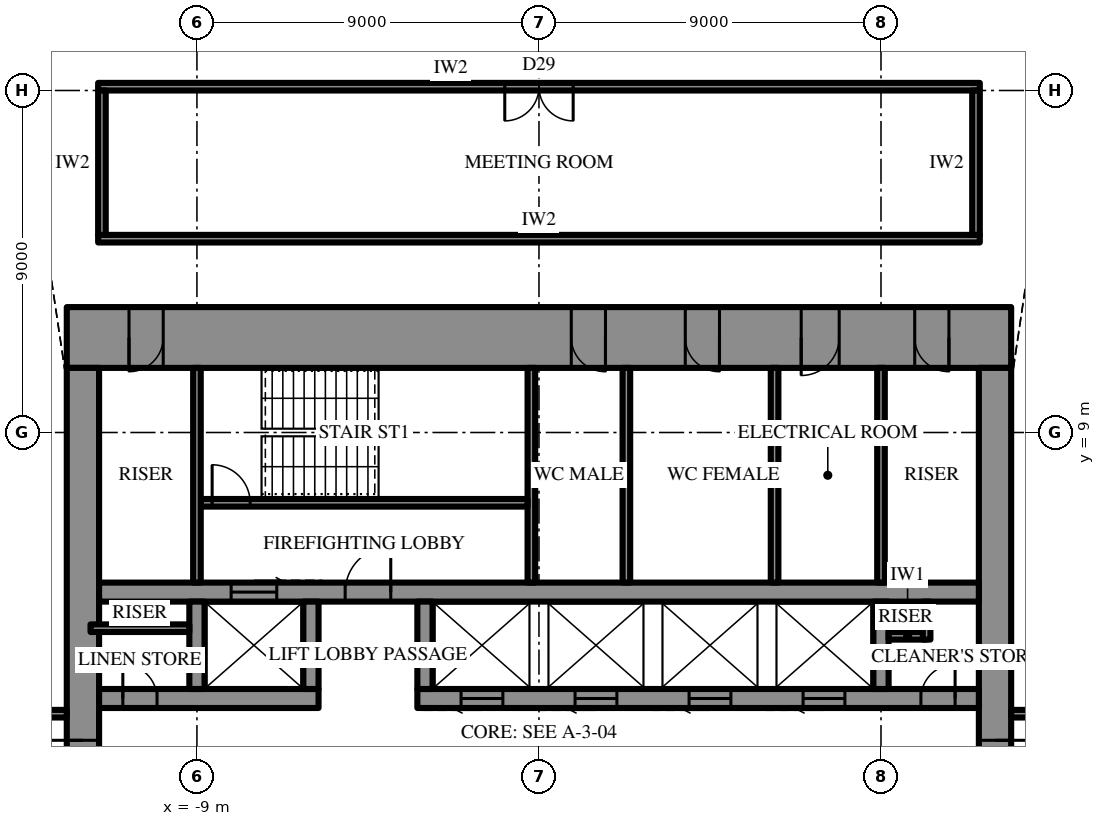
"""IFC4 building model, lengths in metres.
Left out: names, types, materials, properties, quantities, classifications, styles, units other than length and angle.
Written with IfcOpenShell. Run it as: python <this file> out.ifc"""

import sys

from ifc_helpers import new_model, si_unit, direction, frame, frame_2d, origin, place, context, subcontext, project, spatial, rectangle, extrude, element, fill, save


model = new_model("IFC4")
c1 = context("Model", 3, precision=1e-05, world=origin(), true_north=direction((0.0, 1.0)))
c2 = subcontext(c1, "Body", "Model", "MODEL_VIEW")
j1 = project(units=[si_unit("LENGTHUNIT", "METRE"), si_unit("PLANEANGLEUNIT", "RADIAN")], contexts=[c1])
p1 = place(None, origin())
s1 = spatial("IfcSite", under=j1, at=p1, CompositionType="ELEMENT")
p2 = place(p1, origin())
s2 = spatial("IfcBuilding", under=s1, at=p2, CompositionType="ELEMENT")
p3 = place(p2, frame((0.0, 0.0, 315.7)))
s3 = spatial("IfcBuildingStorey", under=s2, at=p3, CompositionType="ELEMENT", Elevation=315.7)
p4 = place(p3, frame((-12.425, 11.5, 0.0), z_axis=(0.0, 0.0, 1.0), x_axis=(1.0, 0.0, 0.0)))
e1 = element("IfcWall", 1, at=p4, inside=s3, PredefinedType="SHEAR", context=c2, shape_type="SweptSolid", body=[
    extrude(rectangle(XDim=24.85, YDim=1.6, at=frame_2d((12.425, 0.0))), origin(), (0.0, 0.0, 1.0), 4.2),
])
p5 = place(p4, frame((13.275, 0.0, 0.0)))
e2 = element("IfcOpeningElement", 2, at=p5, cuts=e1, PredefinedType="OPENING", context=c2, shape_type="SweptSolid", body=[
    extrude(rectangle(XDim=0.9, YDim=2.2, at=frame_2d((0.45, 1.1))), frame((0.0, 0.81, 0.0), z_axis=(0.0, -1.0, 0.0), x_axis=(1.0, 0.0, 0.0)), (0.0, 0.0, 1.0), 1.62),
])
p6 = place(p4, frame((16.275, 0.0, 0.0)))
e3 = element("IfcOpeningElement", 3, at=p6, cuts=e1, PredefinedType="OPENING", context=c2, shape_type="SweptSolid", body=[
    extrude(rectangle(XDim=0.9, YDim=2.2, at=frame_2d((0.45, 1.1))), frame((0.0, 0.81, 0.0), z_axis=(0.0, -1.0, 0.0), x_axis=(1.0, 0.0, 0.0)), (0.0, 0.0, 1.0), 1.62),
])
p7 = place(p4, frame((19.325, 0.0, 0.0)))
e4 = element("IfcOpeningElement", 4, at=p7, cuts=e1, PredefinedType="OPENING", context=c2, shape_type="SweptSolid", body=[
    extrude(rectangle(XDim=1.0, YDim=2.2, at=frame_2d((0.5, 1.1))), frame((0.0, 0.81, 0.0), z_axis=(0.0, -1.0, 0.0), x_axis=(1.0, 0.0, 0.0)), (0.0, 0.0, 1.0), 1.62),
])
p8 = place(p4, frame((1.637, 0.0, 0.0)))
e5 = element("IfcOpeningElement", 5, at=p8, cuts=e1, PredefinedType="OPENING", context=c2, shape_type="SweptSolid", body=[
    extrude(rectangle(XDim=0.9, YDim=2.2, at=frame_2d((0.45, 1.1))), frame((0.0, 0.81, 0.0), z_axis=(0.0, -1.0, 0.0), x_axis=(1.0, 0.0, 0.0)), (0.0, 0.0, 1.0), 1.62),
])
p9 = place(p4, frame((22.312, 0.0, 0.0)))
e6 = element("IfcOpeningElement", 6, at=p9, cuts=e1, PredefinedType="OPENING", context=c2, shape_type="SweptSolid", body=[
    extrude(rectangle(XDim=0.9, YDim=2.2, at=frame_2d((0.45, 1.1))), frame((0.0, 0.81, 0.0), z_axis=(0.0, -1.0, 0.0), x_axis=(1.0, 0.0, 0.0)), (0.0, 0.0, 1.0), 1.62),
])
p10 = place(p3, frame((12.0, -10.7, 0.0), z_axis=(0.0, 0.0, 1.0), x_axis=(0.0, 1.0, 0.0)))
e7 = element("IfcWall", 7, at=p10, inside=s3, PredefinedType="SHEAR", context=c2, shape_type="SweptSolid", body=[
    extrude(rectangle(XDim=21.4, YDim=0.85, at=frame_2d((10.7, 0.0))), origin(), (0.0, 0.0, 1.0), 4.2),
])
p11 = place(p10, frame((9.8, 0.0, 0.0)))
e8 = element("IfcOpeningElement", 8, at=p11, cuts=e7, PredefinedType="OPENING", context=c2, shape_type="SweptSolid", body=[
    extrude(rectangle(XDim=1.8, YDim=2.4, at=frame_2d((0.9, 1.2))), frame((0.0, 0.435, 0.0), z_axis=(0.0, -1.0, 0.0), x_axis=(1.0, 0.0, 0.0)), (0.0, 0.0, 1.0), 0.87),
])
p12 = place(p3, frame((-12.0, 10.7, 0.0), z_axis=(0.0, 0.0, 1.0), x_axis=(0.0, -1.0, 0.0)))
e9 = element("IfcWall", 9, at=p12, inside=s3, PredefinedType="SHEAR", context=c2, shape_type="SweptSolid", body=[
    extrude(rectangle(XDim=21.4, YDim=0.85, at=frame_2d((10.7, 0.0))), origin(), (0.0, 0.0, 1.0), 4.2),
])
p13 = place(p12, frame((9.8, 0.0, 0.0)))
e10 = element("IfcOpeningElement", 10, at=p13, cuts=e9, PredefinedType="OPENING", context=c2, shape_type="SweptSolid", body=[
    extrude(rectangle(XDim=1.8, YDim=2.4, at=frame_2d((0.9, 1.2))), frame((0.0, 0.435, 0.0), z_axis=(0.0, -1.0, 0.0), x_axis=(1.0, 0.0, 0.0)), (0.0, 0.0, 1.0), 0.87),
])
p14 = place(p3, frame((-11.575, 2.0, 0.0), z_axis=(0.0, 0.0, 1.0), x_axis=(1.0, 0.0, 0.0)))
e11 = element("IfcWall", 11, at=p14, inside=s3, PredefinedType="SHEAR", context=c2, shape_type="SweptSolid", body=[
    extrude(rectangle(XDim=5.775, YDim=0.5, at=frame_2d((2.887, 0.0))), origin(), (0.0, 0.0, 1.0), 4.2),
])
p15 = place(p14, frame((0.625, 0.0, 0.0)))
e12 = element("IfcOpeningElement", 12, at=p15, cuts=e11, PredefinedType="OPENING", context=c2, shape_type="SweptSolid", body=[
    extrude(rectangle(XDim=0.9, YDim=2.2, at=frame_2d((0.45, 1.1))), frame((0.0, 0.26, 0.0), z_axis=(0.0, -1.0, 0.0), x_axis=(1.0, 0.0, 0.0)), (0.0, 0.0, 1.0), 0.52),
])
p16 = place(p3, frame((-3.2, 2.0, 0.0), z_axis=(0.0, 0.0, 1.0), x_axis=(1.0, 0.0, 0.0)))
e13 = element("IfcWall", 13, at=p16, inside=s3, PredefinedType="SHEAR", context=c2, shape_type="SweptSolid", body=[
    extrude(rectangle(XDim=14.775, YDim=0.5, at=frame_2d((7.387, 0.0))), origin(), (0.0, 0.0, 1.0), 4.2),
])
p17 = place(p16, frame((13.25, 0.0, 0.0)))
e14 = element("IfcOpeningElement", 14, at=p17, cuts=e13, PredefinedType="OPENING", context=c2, shape_type="SweptSolid", body=[
    extrude(rectangle(XDim=0.9, YDim=2.2, at=frame_2d((0.45, 1.1))), frame((0.0, 0.26, 0.0), z_axis=(0.0, -1.0, 0.0), x_axis=(1.0, 0.0, 0.0)), (0.0, 0.0, 1.0), 0.52),
])
p18 = place(p16, frame((1.15, 0.0, 0.0)))
e15 = element("IfcOpeningElement", 15, at=p18, cuts=e13, PredefinedType="OPENING", context=c2, shape_type="SweptSolid", body=[
    extrude(rectangle(XDim=1.1, YDim=2.2, at=frame_2d((0.55, 1.1))), frame((0.0, 0.26, 0.0), z_axis=(0.0, -1.0, 0.0), x_axis=(1.0, 0.0, 0.0)), (0.0, 0.0, 1.0), 0.52),
])
p19 = place(p16, frame((4.15, 0.0, 0.0)))
e16 = element("IfcOpeningElement", 16, at=p19, cuts=e13, PredefinedType="OPENING", context=c2, shape_type="SweptSolid", body=[
    extrude(rectangle(XDim=1.1, YDim=2.2, at=frame_2d((0.55, 1.1))), frame((0.0, 0.26, 0.0), z_axis=(0.0, -1.0, 0.0), x_axis=(1.0, 0.0, 0.0)), (0.0, 0.0, 1.0), 0.52),
])
p20 = place(p16, frame((7.15, 0.0, 0.0)))
e17 = element("IfcOpeningElement", 17, at=p20, cuts=e13, PredefinedType="OPENING", context=c2, shape_type="SweptSolid", body=[
    extrude(rectangle(XDim=1.1, YDim=2.2, at=frame_2d((0.55, 1.1))), frame((0.0, 0.26, 0.0), z_axis=(0.0, -1.0, 0.0), x_axis=(1.0, 0.0, 0.0)), (0.0, 0.0, 1.0), 0.52),
])
p21 = place(p16, frame((10.15, 0.0, 0.0)))
e18 = element("IfcOpeningElement", 18, at=p21, cuts=e13, PredefinedType="OPENING", context=c2, shape_type="SweptSolid", body=[
    extrude(rectangle(XDim=1.1, YDim=2.2, at=frame_2d((0.55, 1.1))), frame((0.0, 0.26, 0.0), z_axis=(0.0, -1.0, 0.0), x_axis=(1.0, 0.0, 0.0)), (0.0, 0.0, 1.0), 0.52),
])
p22 = place(p3, frame((-11.575, 4.8, 0.0), z_axis=(0.0, 0.0, 1.0), x_axis=(1.0, 0.0, 0.0)))
e19 = element("IfcWall", 19, at=p22, inside=s3, PredefinedType="SHEAR", context=c2, shape_type="SweptSolid", body=[
    extrude(rectangle(XDim=23.15, YDim=0.5, at=frame_2d((11.575, 0.0))), origin(), (0.0, 0.0, 1.0), 4.2),
])
p23 = place(p22, frame((6.475, 0.0, 0.0)))
e20 = element("IfcOpeningElement", 20, at=p23, cuts=e19, PredefinedType="OPENING", context=c2, shape_type="SweptSolid", body=[
    extrude(rectangle(XDim=1.2, YDim=2.2, at=frame_2d((0.6, 1.1))), frame((0.0, 0.26, 0.0), z_axis=(0.0, -1.0, 0.0), x_axis=(1.0, 0.0, 0.0)), (0.0, 0.0, 1.0), 0.52),
])
p24 = place(p22, frame((3.475, 0.0, 0.0)))
e21 = element("IfcOpeningElement", 21, at=p24, cuts=e19, PredefinedType="OPENING", context=c2, shape_type="SweptSolid", body=[
    extrude(rectangle(XDim=1.2, YDim=2.2, at=frame_2d((0.6, 1.1))), frame((0.0, 0.26, 0.0), z_axis=(0.0, -1.0, 0.0), x_axis=(1.0, 0.0, 0.0)), (0.0, 0.0, 1.0), 0.52),
])
for number, where, z_axis, x_axis in (
    (22, (-9.0, 2.25, 0.0), (0.0, 0.0, 1.0), (0.0, 1.0, 0.0)),
    (23, (-6.0, 2.25, 0.0), (0.0, 0.0, 1.0), (0.0, 1.0, 0.0)),
    (24, (-3.0, 2.25, 0.0), (0.0, 0.0, 1.0), (0.0, 1.0, 0.0)),
    (25, (9.0, 2.25, 0.0), (0.0, 0.0, 1.0), (0.0, 1.0, 0.0)),
):
    element("IfcWall", number, at=place(p3, frame(where, z_axis=z_axis, x_axis=x_axis)), inside=s3, PredefinedType="SHEAR", context=c2, shape_type="SweptSolid", body=[
        extrude(rectangle(XDim=2.3, YDim=0.4, at=frame_2d((1.15, 0.0))), origin(), (0.0, 0.0, 1.0), 4.2),
    ])
p25 = place(p3, frame((-0.2, 5.05, 0.0), z_axis=(0.0, 0.0, 1.0), x_axis=(0.0, 1.0, 0.0)))
e26 = element("IfcWall", 26, at=p25, inside=s3, PredefinedType="SHEAR", context=c2, shape_type="SweptSolid", body=[
    extrude(rectangle(XDim=5.65, YDim=0.2, at=frame_2d((2.825, 0.0))), origin(), (0.0, 0.0, 1.0), 4.2),
])
p26 = place(p3, frame((-8.9, 7.15, 0.0), z_axis=(0.0, 0.0, 1.0), x_axis=(1.0, 0.0, 0.0)))
e27 = element("IfcWall", 27, at=p26, inside=s3, PredefinedType="SHEAR", context=c2, shape_type="SweptSolid", body=[
    extrude(rectangle(XDim=8.6, YDim=0.2, at=frame_2d((4.3, 0.0))), origin(), (0.0, 0.0, 1.0), 4.2),
])
p27 = place(p26, frame((0.3, 0.0, 0.0)))
e28 = element("IfcOpeningElement", 28, at=p27, cuts=e27, PredefinedType="OPENING", context=c2, shape_type="SweptSolid", body=[
    extrude(rectangle(XDim=1.0, YDim=2.2, at=frame_2d((0.5, 1.1))), frame((0.0, 0.11, 0.0), z_axis=(0.0, -1.0, 0.0), x_axis=(1.0, 0.0, 0.0)), (0.0, 0.0, 1.0), 0.22),
])
for number, where, z_axis, x_axis in (
    (29, (-9.0, 5.05, 0.0), (0.0, 0.0, 1.0), (0.0, 1.0, 0.0)),
    (30, (9.0, 5.05, 0.0), (0.0, 0.0, 1.0), (0.0, 1.0, 0.0)),
    (31, (2.3, 5.05, 0.0), (0.0, 0.0, 1.0), (0.0, 1.0, 0.0)),
    (32, (6.2, 5.05, 0.0), (0.0, 0.0, 1.0), (0.0, 1.0, 0.0)),
):
    element("IfcWall", number, at=place(p3, frame(where, z_axis=z_axis, x_axis=x_axis)), inside=s3, PredefinedType="PARTITIONING", context=c2, shape_type="SweptSolid", body=[
        extrude(rectangle(XDim=5.65, YDim=0.2, at=frame_2d((2.825, 0.0))), origin(), (0.0, 0.0, 1.0), 4.0),
    ])
p28 = place(p3, frame((-11.8, 3.85, 0.0), z_axis=(0.0, 0.0, 1.0), x_axis=(1.0, 0.0, 0.0)))
e33 = element("IfcWall", 33, at=p28, inside=s3, PredefinedType="PARTITIONING", context=c2, shape_type="SweptSolid", body=[
    extrude(rectangle(XDim=2.6, YDim=0.2, at=frame_2d((1.3, 0.0))), origin(), (0.0, 0.0, 1.0), 4.0),
])
for number, where, z_axis, x_axis in (
    (34, (9.2, 3.65, 0.0), (0.0, 0.0, 1.0), (1.0, 0.0, 0.0)),
    (35, (10.2, 3.55, 0.0), (0.0, 0.0, 1.0), (0.0, 1.0, 0.0)),
):
    element("IfcWall", number, at=place(p3, frame(where, z_axis=z_axis, x_axis=x_axis)), inside=s3, PredefinedType="PARTITIONING", context=c2, shape_type="SweptSolid", body=[
        extrude(rectangle(XDim=1.0, YDim=0.2, at=frame_2d((0.5, 0.0))), origin(), (0.0, 0.0, 1.0), 4.0),
    ])
p29 = place(p3, frame((-11.6, 14.1, 0.0), z_axis=(0.0, 0.0, 1.0), x_axis=(1.0, 0.0, 0.0)))
e36 = element("IfcWall", 36, at=p29, inside=s3, PredefinedType="PARTITIONING", context=c2, shape_type="SweptSolid", body=[
    extrude(rectangle(XDim=23.2, YDim=0.2, at=frame_2d((11.6, 0.0))), origin(), (0.0, 0.0, 1.0), 4.0),
])
p30 = place(p3, frame((-11.6, 18.1, 0.0), z_axis=(0.0, 0.0, 1.0), x_axis=(1.0, 0.0, 0.0)))
e37 = element("IfcWall", 37, at=p30, inside=s3, PredefinedType="PARTITIONING", context=c2, shape_type="SweptSolid", body=[
    extrude(rectangle(XDim=23.2, YDim=0.2, at=frame_2d((11.6, 0.0))), origin(), (0.0, 0.0, 1.0), 4.0),
])
p31 = place(p30, frame((10.7, 0.0, 0.0)))
e38 = element("IfcOpeningElement", 38, at=p31, cuts=e37, PredefinedType="OPENING", context=c2, shape_type="SweptSolid", body=[
    extrude(rectangle(XDim=1.8, YDim=2.4, at=frame_2d((0.9, 1.2))), frame((0.0, 0.11, 0.0), z_axis=(0.0, -1.0, 0.0), x_axis=(1.0, 0.0, 0.0)), (0.0, 0.0, 1.0), 0.22),
])
for number, where, z_axis, x_axis in (
    (39, (-11.5, 14.2, 0.0), (0.0, 0.0, 1.0), (0.0, 1.0, 0.0)),
    (40, (11.5, 14.2, 0.0), (0.0, 0.0, 1.0), (0.0, 1.0, 0.0)),
):
    element("IfcWall", number, at=place(p3, frame(where, z_axis=z_axis, x_axis=x_axis)), inside=s3, PredefinedType="PARTITIONING", context=c2, shape_type="SweptSolid", body=[
        extrude(rectangle(XDim=3.8, YDim=0.2, at=frame_2d((1.9, 0.0))), origin(), (0.0, 0.0, 1.0), 4.0),
    ])
p32 = place(p3, frame((12.425, 1.6, 0.0), z_axis=(0.0, 0.0, 1.0), x_axis=(1.0, 0.0, 0.0)))
e41 = element("IfcWall", 41, at=p32, inside=s3, PredefinedType="PARTITIONING", context=c2, shape_type="SweptSolid", body=[
    extrude(rectangle(XDim=16.327, YDim=0.2, at=frame_2d((8.164, 0.0))), origin(), (0.0, 0.0, 1.0), 4.0),
])
p33 = place(p32, frame((1.133, 0.0, 0.0)))
e42 = element("IfcOpeningElement", 42, at=p33, cuts=e41, PredefinedType="OPENING", context=c2, shape_type="SweptSolid", body=[
    extrude(rectangle(XDim=1.0, YDim=2.2, at=frame_2d((0.5, 1.1))), frame((0.0, 0.11, 0.0), z_axis=(0.0, -1.0, 0.0), x_axis=(1.0, 0.0, 0.0)), (0.0, 0.0, 1.0), 0.22),
])
p34 = place(p3, frame((-12.425, 1.6, 0.0), z_axis=(0.0, 0.0, 1.0), x_axis=(-1.0, 0.0, 0.0)))
e43 = element("IfcWall", 43, at=p34, inside=s3, PredefinedType="PARTITIONING", context=c2, shape_type="SweptSolid", body=[
    extrude(rectangle(XDim=16.327, YDim=0.2, at=frame_2d((8.164, 0.0))), origin(), (0.0, 0.0, 1.0), 4.0),
])
p35 = place(p34, frame((1.133, 0.0, 0.0)))
e44 = element("IfcOpeningElement", 44, at=p35, cuts=e43, PredefinedType="OPENING", context=c2, shape_type="SweptSolid", body=[
    extrude(rectangle(XDim=1.0, YDim=2.2, at=frame_2d((0.5, 1.1))), frame((0.0, 0.11, 0.0), z_axis=(0.0, -1.0, 0.0), x_axis=(1.0, 0.0, 0.0)), (0.0, 0.0, 1.0), 0.22),
])
p36 = place(p11, frame((1.8, 0.0, 0.0), z_axis=(0.0, 0.0, 1.0), x_axis=(-1.0, 0.0, 0.0)))
e45 = element("IfcDoor", 45, at=p36, inside=s3, OperationType="DOUBLE_DOOR_SINGLE_SWING", PredefinedType="DOOR", context=c2, shape_type="SweptSolid", body=[
    extrude(rectangle(XDim=1.8, YDim=2.4, at=frame_2d((0.9, 1.2))), frame((0.0, 0.025, 0.0), z_axis=(0.0, -1.0, 0.0), x_axis=(1.0, 0.0, 0.0)), (0.0, 0.0, 1.0), 0.05),
])
fill(e8, e45)
p37 = place(p13, frame((1.8, 0.0, 0.0), z_axis=(0.0, 0.0, 1.0), x_axis=(-1.0, 0.0, 0.0)))
e46 = element("IfcDoor", 46, at=p37, inside=s3, OperationType="DOUBLE_DOOR_SINGLE_SWING", PredefinedType="DOOR", context=c2, shape_type="SweptSolid", body=[
    extrude(rectangle(XDim=1.8, YDim=2.4, at=frame_2d((0.9, 1.2))), frame((0.0, 0.025, 0.0), z_axis=(0.0, -1.0, 0.0), x_axis=(1.0, 0.0, 0.0)), (0.0, 0.0, 1.0), 0.05),
])
fill(e10, e46)
p38 = place(p23, origin())
e47 = element("IfcDoor", 47, at=p38, inside=s3, OperationType="SINGLE_SWING_LEFT", PredefinedType="DOOR", context=c2, shape_type="SweptSolid", body=[
    extrude(rectangle(XDim=1.2, YDim=2.2, at=frame_2d((0.6, 1.1))), frame((0.0, 0.025, 0.0), z_axis=(0.0, -1.0, 0.0), x_axis=(1.0, 0.0, 0.0)), (0.0, 0.0, 1.0), 0.05),
])
fill(e20, e47)
p39 = place(p27, origin())
e48 = element("IfcDoor", 48, at=p39, inside=s3, OperationType="SINGLE_SWING_RIGHT", PredefinedType="DOOR", context=c2, shape_type="SweptSolid", body=[
    extrude(rectangle(XDim=1.0, YDim=2.2, at=frame_2d((0.5, 1.1))), frame((0.0, 0.025, 0.0), z_axis=(0.0, -1.0, 0.0), x_axis=(1.0, 0.0, 0.0)), (0.0, 0.0, 1.0), 0.05),
])
fill(e28, e48)
p40 = place(p5, frame((0.9, 0.0, 0.0), z_axis=(0.0, 0.0, 1.0), x_axis=(-1.0, 0.0, 0.0)))
e49 = element("IfcDoor", 49, at=p40, inside=s3, OperationType="SINGLE_SWING_RIGHT", PredefinedType="DOOR", context=c2, shape_type="SweptSolid", body=[
    extrude(rectangle(XDim=0.9, YDim=2.2, at=frame_2d((0.45, 1.1))), frame((0.0, 0.025, 0.0), z_axis=(0.0, -1.0, 0.0), x_axis=(1.0, 0.0, 0.0)), (0.0, 0.0, 1.0), 0.05),
])
fill(e2, e49)
p41 = place(p6, frame((0.9, 0.0, 0.0), z_axis=(0.0, 0.0, 1.0), x_axis=(-1.0, 0.0, 0.0)))
e50 = element("IfcDoor", 50, at=p41, inside=s3, OperationType="SINGLE_SWING_RIGHT", PredefinedType="DOOR", context=c2, shape_type="SweptSolid", body=[
    extrude(rectangle(XDim=0.9, YDim=2.2, at=frame_2d((0.45, 1.1))), frame((0.0, 0.025, 0.0), z_axis=(0.0, -1.0, 0.0), x_axis=(1.0, 0.0, 0.0)), (0.0, 0.0, 1.0), 0.05),
])
fill(e3, e50)
p42 = place(p7, frame((1.0, 0.0, 0.0), z_axis=(0.0, 0.0, 1.0), x_axis=(-1.0, 0.0, 0.0)))
e51 = element("IfcDoor", 51, at=p42, inside=s3, OperationType="SINGLE_SWING_LEFT", PredefinedType="DOOR", context=c2, shape_type="SweptSolid", body=[
    extrude(rectangle(XDim=1.0, YDim=2.2, at=frame_2d((0.5, 1.1))), frame((0.0, 0.025, 0.0), z_axis=(0.0, -1.0, 0.0), x_axis=(1.0, 0.0, 0.0)), (0.0, 0.0, 1.0), 0.05),
])
fill(e4, e51)
p43 = place(p8, frame((0.9, 0.0, 0.0), z_axis=(0.0, 0.0, 1.0), x_axis=(-1.0, 0.0, 0.0)))
e52 = element("IfcDoor", 52, at=p43, inside=s3, OperationType="SINGLE_SWING_LEFT", PredefinedType="DOOR", context=c2, shape_type="SweptSolid", body=[
    extrude(rectangle(XDim=0.9, YDim=2.2, at=frame_2d((0.45, 1.1))), frame((0.0, 0.025, 0.0), z_axis=(0.0, -1.0, 0.0), x_axis=(1.0, 0.0, 0.0)), (0.0, 0.0, 1.0), 0.05),
])
fill(e5, e52)
p44 = place(p9, frame((0.9, 0.0, 0.0), z_axis=(0.0, 0.0, 1.0), x_axis=(-1.0, 0.0, 0.0)))
e53 = element("IfcDoor", 53, at=p44, inside=s3, OperationType="SINGLE_SWING_RIGHT", PredefinedType="DOOR", context=c2, shape_type="SweptSolid", body=[
    extrude(rectangle(XDim=0.9, YDim=2.2, at=frame_2d((0.45, 1.1))), frame((0.0, 0.025, 0.0), z_axis=(0.0, -1.0, 0.0), x_axis=(1.0, 0.0, 0.0)), (0.0, 0.0, 1.0), 0.05),
])
fill(e6, e53)
p45 = place(p15, origin())
e54 = element("IfcDoor", 54, at=p45, inside=s3, OperationType="SINGLE_SWING_RIGHT", PredefinedType="DOOR", context=c2, shape_type="SweptSolid", body=[
    extrude(rectangle(XDim=0.9, YDim=2.2, at=frame_2d((0.45, 1.1))), frame((0.0, 0.025, 0.0), z_axis=(0.0, -1.0, 0.0), x_axis=(1.0, 0.0, 0.0)), (0.0, 0.0, 1.0), 0.05),
])
fill(e12, e54)
p46 = place(p17, origin())
e55 = element("IfcDoor", 55, at=p46, inside=s3, OperationType="SINGLE_SWING_LEFT", PredefinedType="DOOR", context=c2, shape_type="SweptSolid", body=[
    extrude(rectangle(XDim=0.9, YDim=2.2, at=frame_2d((0.45, 1.1))), frame((0.0, 0.025, 0.0), z_axis=(0.0, -1.0, 0.0), x_axis=(1.0, 0.0, 0.0)), (0.0, 0.0, 1.0), 0.05),
])
fill(e14, e55)
p47 = place(p24, origin())
e56 = element("IfcDoor", 56, at=p47, inside=s3, OperationType="SLIDING_TO_LEFT", PredefinedType="DOOR", context=c2, shape_type="SweptSolid", body=[
    extrude(rectangle(XDim=1.2, YDim=2.2, at=frame_2d((0.6, 1.1))), frame((0.0, 0.025, 0.0), z_axis=(0.0, -1.0, 0.0), x_axis=(1.0, 0.0, 0.0)), (0.0, 0.0, 1.0), 0.05),
])
fill(e21, e56)
p48 = place(p18, frame((1.1, 0.0, 0.0), z_axis=(0.0, 0.0, 1.0), x_axis=(-1.0, 0.0, 0.0)))
e57 = element("IfcDoor", 57, at=p48, inside=s3, OperationType="SLIDING_TO_LEFT", PredefinedType="DOOR", context=c2, shape_type="SweptSolid", body=[
    extrude(rectangle(XDim=1.1, YDim=2.2, at=frame_2d((0.55, 1.1))), frame((0.0, 0.025, 0.0), z_axis=(0.0, -1.0, 0.0), x_axis=(1.0, 0.0, 0.0)), (0.0, 0.0, 1.0), 0.05),
])
fill(e15, e57)
p49 = place(p19, frame((1.1, 0.0, 0.0), z_axis=(0.0, 0.0, 1.0), x_axis=(-1.0, 0.0, 0.0)))
e58 = element("IfcDoor", 58, at=p49, inside=s3, OperationType="SLIDING_TO_LEFT", PredefinedType="DOOR", context=c2, shape_type="SweptSolid", body=[
    extrude(rectangle(XDim=1.1, YDim=2.2, at=frame_2d((0.55, 1.1))), frame((0.0, 0.025, 0.0), z_axis=(0.0, -1.0, 0.0), x_axis=(1.0, 0.0, 0.0)), (0.0, 0.0, 1.0), 0.05),
])
fill(e16, e58)
p50 = place(p20, frame((1.1, 0.0, 0.0), z_axis=(0.0, 0.0, 1.0), x_axis=(-1.0, 0.0, 0.0)))
e59 = element("IfcDoor", 59, at=p50, inside=s3, OperationType="SLIDING_TO_LEFT", PredefinedType="DOOR", context=c2, shape_type="SweptSolid", body=[
    extrude(rectangle(XDim=1.1, YDim=2.2, at=frame_2d((0.55, 1.1))), frame((0.0, 0.025, 0.0), z_axis=(0.0, -1.0, 0.0), x_axis=(1.0, 0.0, 0.0)), (0.0, 0.0, 1.0), 0.05),
])
fill(e17, e59)
p51 = place(p21, frame((1.1, 0.0, 0.0), z_axis=(0.0, 0.0, 1.0), x_axis=(-1.0, 0.0, 0.0)))
e60 = element("IfcDoor", 60, at=p51, inside=s3, OperationType="SLIDING_TO_LEFT", PredefinedType="DOOR", context=c2, shape_type="SweptSolid", body=[
    extrude(rectangle(XDim=1.1, YDim=2.2, at=frame_2d((0.55, 1.1))), frame((0.0, 0.025, 0.0), z_axis=(0.0, -1.0, 0.0), x_axis=(1.0, 0.0, 0.0)), (0.0, 0.0, 1.0), 0.05),
])
fill(e18, e60)
p52 = place(p31, frame((1.8, 0.0, 0.0), z_axis=(0.0, 0.0, 1.0), x_axis=(-1.0, 0.0, 0.0)))
e61 = element("IfcDoor", 61, at=p52, inside=s3, OperationType="DOUBLE_DOOR_SINGLE_SWING", PredefinedType="DOOR", context=c2, shape_type="SweptSolid", body=[
    extrude(rectangle(XDim=1.8, YDim=2.4, at=frame_2d((0.9, 1.2))), frame((0.0, 0.025, 0.0), z_axis=(0.0, -1.0, 0.0), x_axis=(1.0, 0.0, 0.0)), (0.0, 0.0, 1.0), 0.05),
])
fill(e38, e61)
save(model, sys.argv[1])
